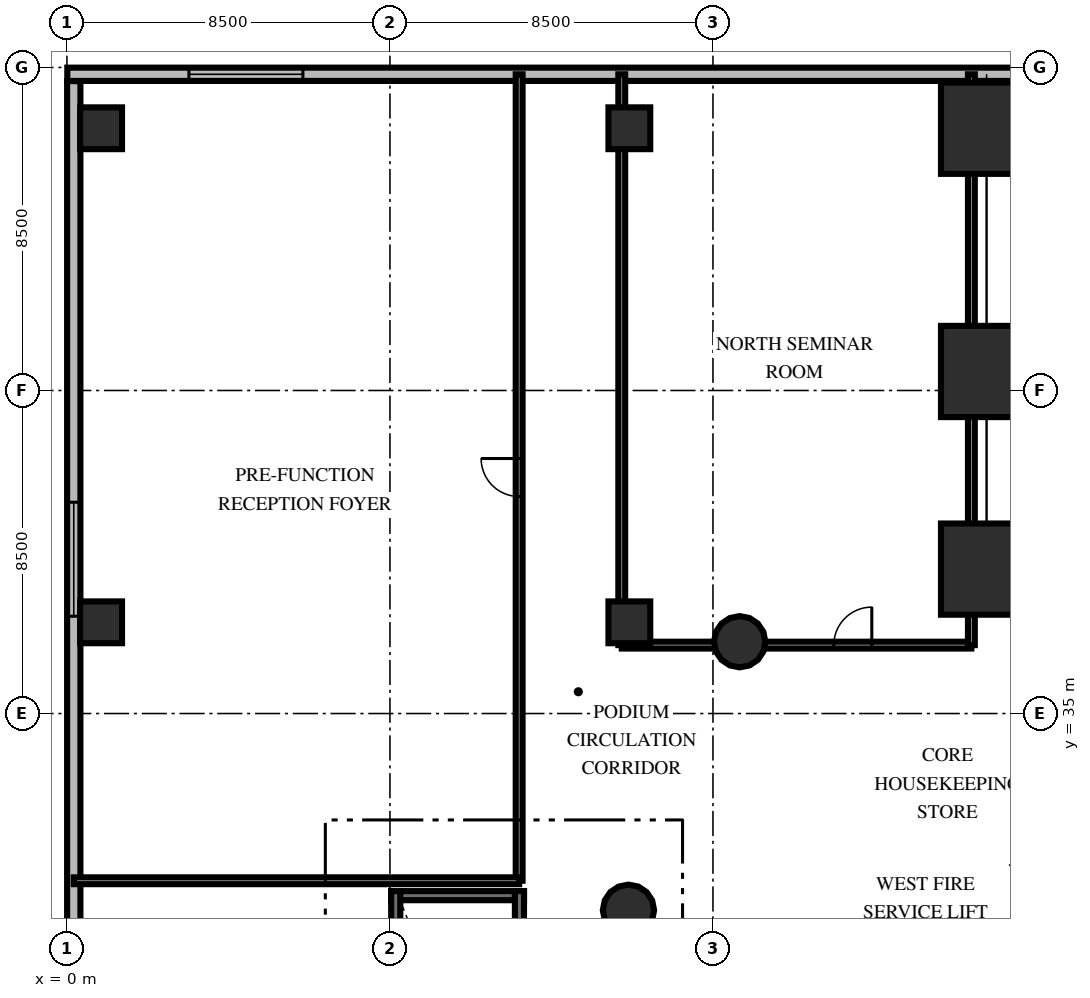
"""IFC4 building model, lengths in metres.
Left out: names, types, materials, properties, quantities, classifications, styles, units other than length and angle.
Written with IfcOpenShell. Run it as: python <this file> out.ifc"""

import sys

from ifc_helpers import new_model, si_unit, direction, frame, frame_2d, origin, origin_2d, place, context, subcontext, project, spatial, rectangle, circle, extrude, element, fill, save


model = new_model("IFC4")
c1 = context("Model", 3, precision=1e-05, world=origin(), true_north=direction((0.0, 1.0)))
c2 = subcontext(c1, "Body", "Model", "MODEL_VIEW")
j1 = project(units=[si_unit("LENGTHUNIT", "METRE"), si_unit("PLANEANGLEUNIT", "RADIAN")], contexts=[c1])
p1 = place(None, origin())
s1 = spatial("IfcSite", under=j1, at=p1, CompositionType="ELEMENT")
p2 = place(p1, origin())
s2 = spatial("IfcBuilding", under=s1, at=p2, CompositionType="ELEMENT")
p3 = place(p2, frame((0.0, 0.0, 5.4)))
s3 = spatial("IfcBuildingStorey", under=s2, at=p3, CompositionType="ELEMENT", Elevation=5.4)
p4 = place(p3, frame((8.532, 30.208, 0.0), z_axis=(0.0, 0.0, 1.0), x_axis=(1.0, 0.0, 0.0)))
e1 = element("IfcWall", 1, at=p4, inside=s3, PredefinedType="SHEAR", context=c2, shape_type="SweptSolid", body=[
    extrude(rectangle(XDim=3.496, YDim=0.24, at=frame_2d((1.748, 0.0))), origin(), (0.0, 0.0, 1.0), 4.8),
])
p5 = place(p3, frame((8.652, 20.772, 0.0), z_axis=(0.0, 0.0, 1.0), x_axis=(0.0, 1.0, 0.0)))
e2 = element("IfcWall", 2, at=p5, inside=s3, PredefinedType="SHEAR", context=c2, shape_type="SweptSolid", body=[
    extrude(rectangle(XDim=9.556, YDim=0.24, at=frame_2d((4.778, 0.0))), origin(), (0.0, 0.0, 1.0), 4.8),
])
p6 = place(p3, frame((11.908, 20.772, 0.0), z_axis=(0.0, 0.0, 1.0), x_axis=(0.0, 1.0, 0.0)))
e3 = element("IfcWall", 3, at=p6, inside=s3, PredefinedType="SHEAR", context=c2, shape_type="SweptSolid", body=[
    extrude(rectangle(XDim=9.556, YDim=0.24, at=frame_2d((4.778, 0.0))), origin(), (0.0, 0.0, 1.0), 4.8),
])
p7 = place(p6, frame((0.55, 0.0, 0.0)))
e4 = element("IfcOpeningElement", 4, at=p7, cuts=e3, PredefinedType="OPENING", context=c2, shape_type="SweptSolid", body=[
    extrude(rectangle(XDim=1.05, YDim=2.15, at=frame_2d((0.525, 1.075))), frame((0.0, 0.13, 0.0), z_axis=(0.0, -1.0, 0.0), x_axis=(1.0, 0.0, 0.0)), (0.0, 0.0, 1.0), 0.26),
])
for number, where, z_axis, x_axis in (
    (5, (24.2, 38.8, 0.0), (0.0, 0.0, 1.0), (1.0, 0.0, 0.0)),
    (6, (24.2, 44.0, 0.0), (0.0, 0.0, 1.0), (1.0, 0.0, 0.0)),
    (7, (24.2, 50.4, 0.0), (0.0, 0.0, 1.0), (1.0, 0.0, 0.0)),
):
    element("IfcColumn", number, at=place(p3, frame(where, z_axis=z_axis, x_axis=x_axis)), inside=s3, PredefinedType="USERDEFINED", context=c2, shape_type="SweptSolid", body=[
        extrude(rectangle(XDim=2.4, YDim=2.4, at=origin_2d()), origin(), (0.0, 0.0, 1.0), 4.8),
    ])
for number, where, z_axis, x_axis in (
    (8, (0.9, 37.4, 0.0), (0.0, 0.0, 1.0), (1.0, 0.0, 0.0)),
    (9, (0.9, 50.4, 0.0), (0.0, 0.0, 1.0), (1.0, 0.0, 0.0)),
    (10, (14.8, 37.4, 0.0), (0.0, 0.0, 1.0), (1.0, 0.0, 0.0)),
    (11, (14.8, 50.4, 0.0), (0.0, 0.0, 1.0), (1.0, 0.0, 0.0)),
):
    element("IfcColumn", number, at=place(p3, frame(where, z_axis=z_axis, x_axis=x_axis)), inside=s3, PredefinedType="COLUMN", context=c2, shape_type="SweptSolid", body=[
        extrude(rectangle(XDim=1.1, YDim=1.1, at=origin_2d()), origin(), (0.0, 0.0, 1.0), 4.8),
    ])
for number, where, z_axis, x_axis in (
    (12, (17.703, 36.889, 0.0), (0.0, 0.0, 1.0), (1.0, 0.0, 0.0)),
    (13, (14.777, 29.824, 0.0), (0.0, 0.0, 1.0), (1.0, 0.0, 0.0)),
):
    element("IfcColumn", number, at=place(p3, frame(where, z_axis=z_axis, x_axis=x_axis)), inside=s3, PredefinedType="COLUMN", context=c2, shape_type="SweptSolid", body=[
        extrude(circle(Radius=0.675, at=origin_2d()), origin(), (0.0, 0.0, 1.0), 4.8),
    ])
p8 = place(p3, frame((0.18, 0.36, 0.0), z_axis=(0.0, 0.0, 1.0), x_axis=(0.0, 1.0, 0.0)))
e14 = element("IfcWall", 14, at=p8, inside=s3, PredefinedType="SOLIDWALL", context=c2, shape_type="SweptSolid", body=[
    extrude(rectangle(XDim=51.28, YDim=0.35, at=frame_2d((25.64, 0.0))), origin(), (0.0, 0.0, 1.0), 3.76),
])
p9 = place(p8, frame((3.2, 0.0, 0.85)))
e15 = element("IfcOpeningElement", 15, at=p9, cuts=e14, PredefinedType="OPENING", context=c2, shape_type="SweptSolid", body=[
    extrude(rectangle(XDim=3.0, YDim=2.4, at=frame_2d((1.5, 1.2))), frame((0.0, 0.185, 0.0), z_axis=(0.0, -1.0, 0.0), x_axis=(1.0, 0.0, 0.0)), (0.0, 0.0, 1.0), 0.37),
])
p10 = place(p8, frame((11.7, 0.0, 0.85)))
e16 = element("IfcOpeningElement", 16, at=p10, cuts=e14, PredefinedType="OPENING", context=c2, shape_type="SweptSolid", body=[
    extrude(rectangle(XDim=3.0, YDim=2.4, at=frame_2d((1.5, 1.2))), frame((0.0, 0.185, 0.0), z_axis=(0.0, -1.0, 0.0), x_axis=(1.0, 0.0, 0.0)), (0.0, 0.0, 1.0), 0.37),
])
p11 = place(p8, frame((22.05, 0.0, 0.85)))
e17 = element("IfcOpeningElement", 17, at=p11, cuts=e14, PredefinedType="OPENING", context=c2, shape_type="SweptSolid", body=[
    extrude(rectangle(XDim=3.0, YDim=2.4, at=frame_2d((1.5, 1.2))), frame((0.0, 0.185, 0.0), z_axis=(0.0, -1.0, 0.0), x_axis=(1.0, 0.0, 0.0)), (0.0, 0.0, 1.0), 0.37),
])
p12 = place(p8, frame((37.2, 0.0, 0.85)))
e18 = element("IfcOpeningElement", 18, at=p12, cuts=e14, PredefinedType="OPENING", context=c2, shape_type="SweptSolid", body=[
    extrude(rectangle(XDim=3.0, YDim=2.4, at=frame_2d((1.5, 1.2))), frame((0.0, 0.185, 0.0), z_axis=(0.0, -1.0, 0.0), x_axis=(1.0, 0.0, 0.0)), (0.0, 0.0, 1.0), 0.37),
])
p13 = place(p3, frame((0.01, 51.82, 0.0), z_axis=(0.0, 0.0, 1.0), x_axis=(1.0, 0.0, 0.0)))
e19 = element("IfcWall", 19, at=p13, inside=s3, PredefinedType="SOLIDWALL", context=c2, shape_type="SweptSolid", body=[
    extrude(rectangle(XDim=25.37, YDim=0.35, at=frame_2d((12.685, 0.0))), origin(), (0.0, 0.0, 1.0), 3.76),
])
p14 = place(p13, frame((3.2, 0.0, 0.85)))
e20 = element("IfcOpeningElement", 20, at=p14, cuts=e19, PredefinedType="OPENING", context=c2, shape_type="SweptSolid", body=[
    extrude(rectangle(XDim=3.0, YDim=2.4, at=frame_2d((1.5, 1.2))), frame((0.0, 0.185, 0.0), z_axis=(0.0, -1.0, 0.0), x_axis=(1.0, 0.0, 0.0)), (0.0, 0.0, 1.0), 0.37),
])
p15 = place(p3, frame((11.9, 30.6, 0.0), z_axis=(0.0, 0.0, 1.0), x_axis=(0.0, 1.0, 0.0)))
e21 = element("IfcWall", 21, at=p15, inside=s3, PredefinedType="PARTITIONING", context=c2, shape_type="SweptSolid", body=[
    extrude(rectangle(XDim=21.22, YDim=0.18, at=frame_2d((10.61, 0.0))), origin(), (0.0, 0.0, 1.0), 3.56),
])
p16 = place(p15, frame((10.11, 0.0, 0.0)))
e22 = element("IfcOpeningElement", 22, at=p16, cuts=e21, PredefinedType="OPENING", context=c2, shape_type="SweptSolid", body=[
    extrude(rectangle(XDim=1.0, YDim=2.15, at=frame_2d((0.5, 1.075))), frame((0.0, 0.1, 0.0), z_axis=(0.0, -1.0, 0.0), x_axis=(1.0, 0.0, 0.0)), (0.0, 0.0, 1.0), 0.2),
])
p17 = place(p3, frame((0.18, 30.6, 0.0), z_axis=(0.0, 0.0, 1.0), x_axis=(1.0, 0.0, 0.0)))
e23 = element("IfcWall", 23, at=p17, inside=s3, PredefinedType="PARTITIONING", context=c2, shape_type="SweptSolid", body=[
    extrude(rectangle(XDim=11.72, YDim=0.18, at=frame_2d((5.86, 0.0))), origin(), (0.0, 0.0, 1.0), 3.56),
])
p18 = place(p3, frame((14.6, 36.8, 0.0), z_axis=(0.0, 0.0, 1.0), x_axis=(1.0, 0.0, 0.0)))
e24 = element("IfcWall", 24, at=p18, inside=s3, PredefinedType="PARTITIONING", context=c2, shape_type="SweptSolid", body=[
    extrude(rectangle(XDim=9.2, YDim=0.18, at=frame_2d((4.6, 0.0))), origin(), (0.0, 0.0, 1.0), 3.56),
])
p19 = place(p18, frame((5.58, 0.0, 0.0)))
e25 = element("IfcOpeningElement", 25, at=p19, cuts=e24, PredefinedType="OPENING", context=c2, shape_type="SweptSolid", body=[
    extrude(rectangle(XDim=1.0, YDim=2.15, at=frame_2d((0.5, 1.075))), frame((0.0, 0.1, 0.0), z_axis=(0.0, -1.0, 0.0), x_axis=(1.0, 0.0, 0.0)), (0.0, 0.0, 1.0), 0.2),
])
for number, where, z_axis, x_axis in (
    (26, (23.8, 36.8, 0.0), (0.0, 0.0, 1.0), (0.0, 1.0, 0.0)),
    (27, (14.6, 51.82, 0.0), (0.0, 0.0, 1.0), (0.0, -1.0, 0.0)),
):
    element("IfcWall", number, at=place(p3, frame(where, z_axis=z_axis, x_axis=x_axis)), inside=s3, PredefinedType="PARTITIONING", context=c2, shape_type="SweptSolid", body=[
        extrude(rectangle(XDim=15.02, YDim=0.18, at=frame_2d((7.51, 0.0))), origin(), (0.0, 0.0, 1.0), 3.56),
    ])
p20 = place(p12, origin())
e28 = element("IfcWindow", 28, at=p20, inside=s3, PartitioningType="SINGLE_PANEL", PredefinedType="WINDOW", context=c2, shape_type="SweptSolid", body=[
    extrude(rectangle(XDim=3.0, YDim=2.4, at=frame_2d((1.5, 1.2))), frame((0.0, 0.03, 0.0), z_axis=(0.0, -1.0, 0.0), x_axis=(1.0, 0.0, 0.0)), (0.0, 0.0, 1.0), 0.06),
])
fill(e18, e28)
p21 = place(p14, origin())
e29 = element("IfcWindow", 29, at=p21, inside=s3, PartitioningType="SINGLE_PANEL", PredefinedType="WINDOW", context=c2, shape_type="SweptSolid", body=[
    extrude(rectangle(XDim=3.0, YDim=2.4, at=frame_2d((1.5, 1.2))), frame((0.0, 0.03, 0.0), z_axis=(0.0, -1.0, 0.0), x_axis=(1.0, 0.0, 0.0)), (0.0, 0.0, 1.0), 0.06),
])
fill(e20, e29)
p22 = place(p16, origin())
e30 = element("IfcDoor", 30, at=p22, inside=s3, OperationType="SINGLE_SWING_RIGHT", PredefinedType="DOOR", context=c2, shape_type="SweptSolid", body=[
    extrude(rectangle(XDim=1.0, YDim=2.15, at=frame_2d((0.5, 1.075))), frame((0.0, 0.025, 0.0), z_axis=(0.0, -1.0, 0.0), x_axis=(1.0, 0.0, 0.0)), (0.0, 0.0, 1.0), 0.05),
])
fill(e22, e30)
p23 = place(p19, origin())
e31 = element("IfcDoor", 31, at=p23, inside=s3, OperationType="SINGLE_SWING_RIGHT", PredefinedType="DOOR", context=c2, shape_type="SweptSolid", body=[
    extrude(rectangle(XDim=1.0, YDim=2.15, at=frame_2d((0.5, 1.075))), frame((0.0, 0.025, 0.0), z_axis=(0.0, -1.0, 0.0), x_axis=(1.0, 0.0, 0.0)), (0.0, 0.0, 1.0), 0.05),
])
fill(e25, e31)
save(model, sys.argv[1])
